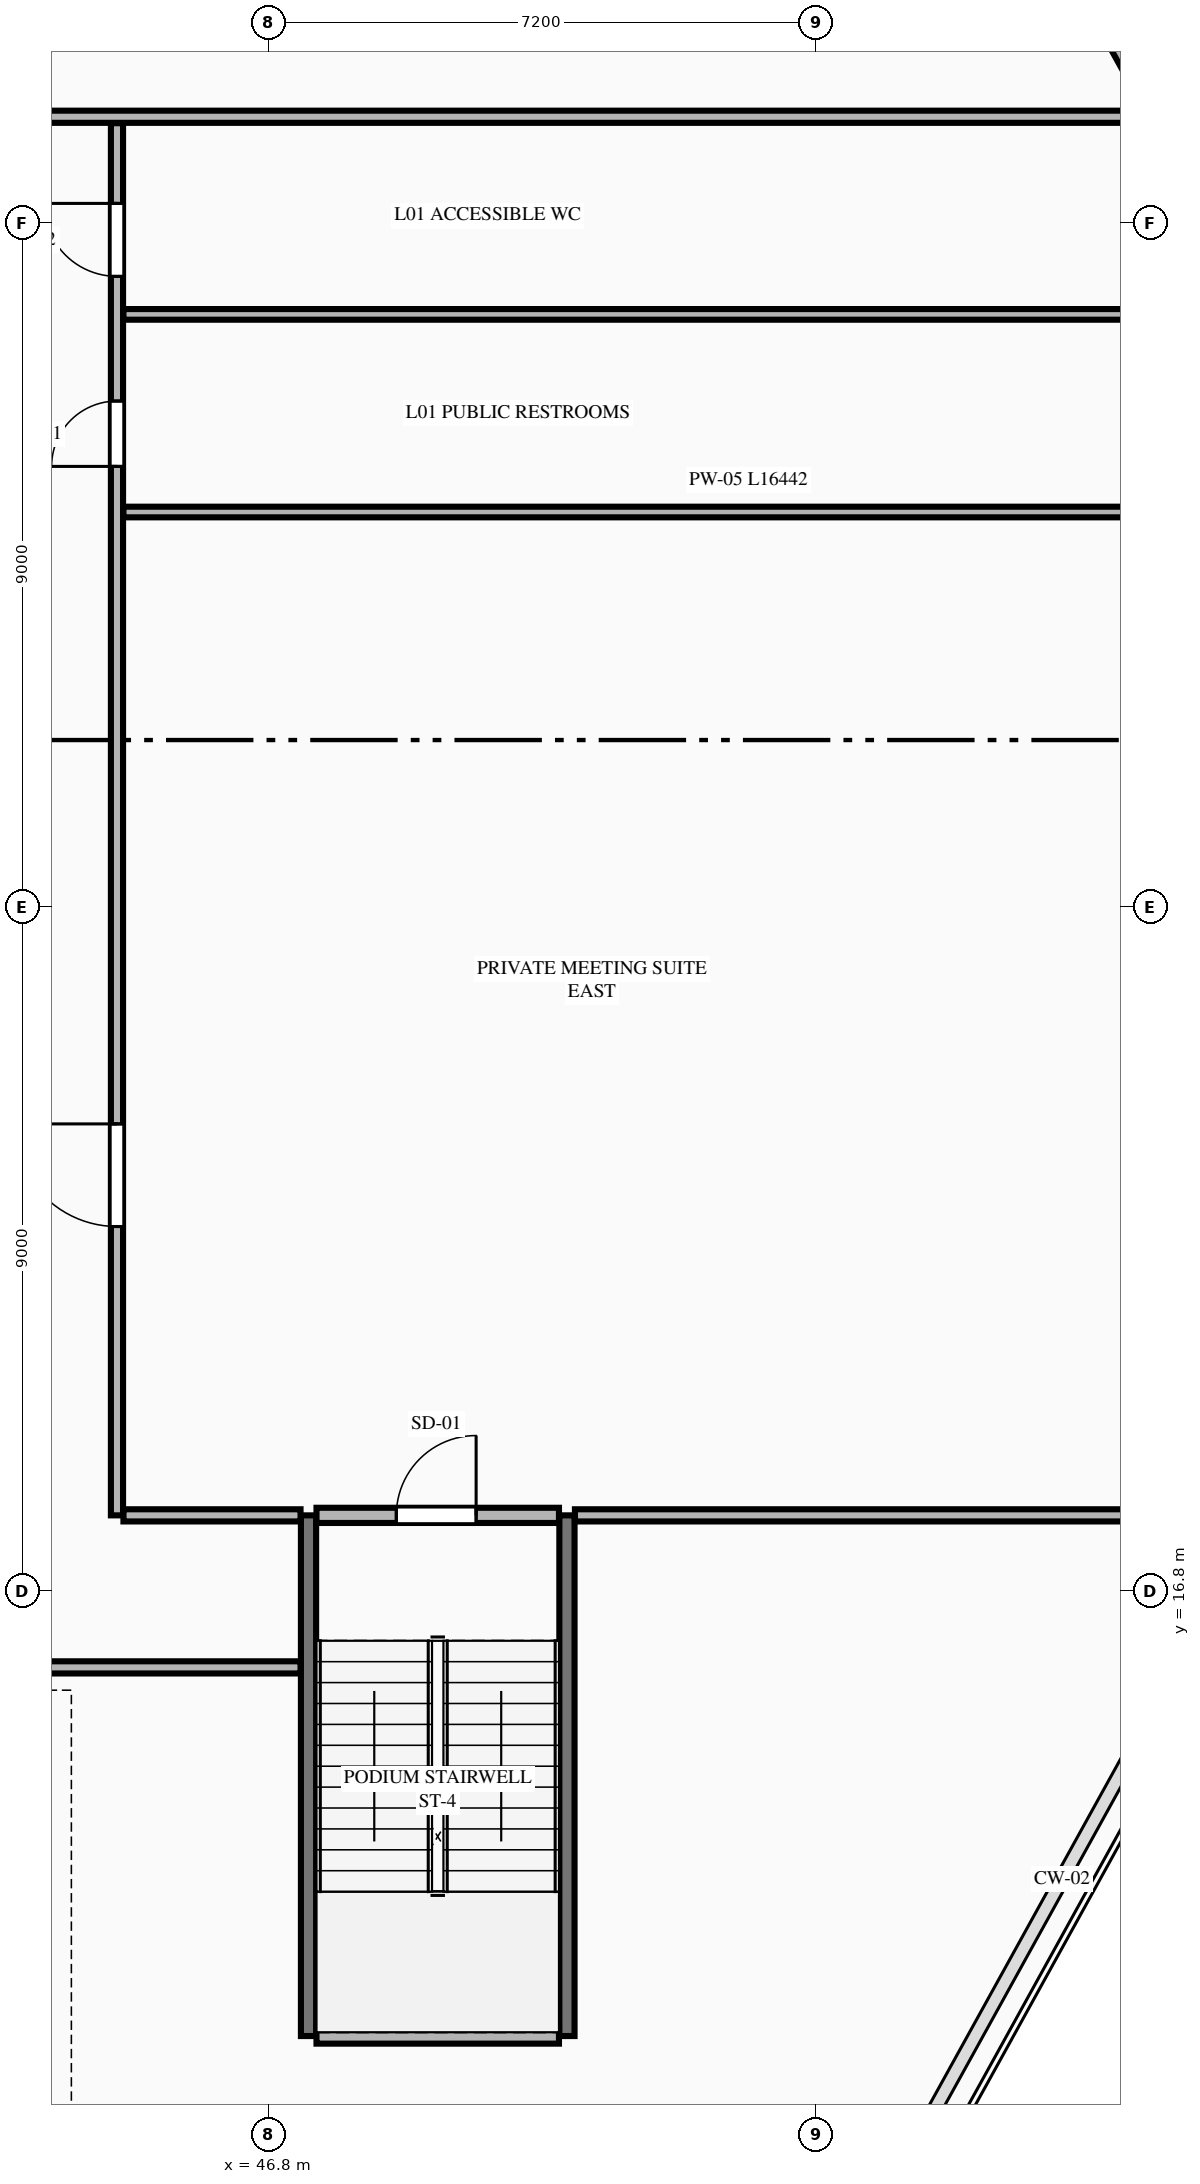
"""IFC4 building model, lengths in metres.
Left out: names, types, materials, properties, quantities, classifications, styles, units other than length and angle.
Written with IfcOpenShell. Run it as: python <this file> out.ifc"""

import sys

from ifc_helpers import new_model, si_unit, direction, frame, frame_2d, origin, place, context, subcontext, project, spatial, rectangle, extrude, element, fill, save


model = new_model("IFC4")
c1 = context("Model", 3, precision=1e-05, world=origin(), true_north=direction((0.0, 1.0)))
c2 = subcontext(c1, "Body", "Model", "MODEL_VIEW")
j1 = project(units=[si_unit("LENGTHUNIT", "METRE"), si_unit("PLANEANGLEUNIT", "RADIAN")], contexts=[c1])
p1 = place(None, origin())
s1 = spatial("IfcSite", under=j1, at=p1, CompositionType="ELEMENT")
p2 = place(p1, origin())
s2 = spatial("IfcBuilding", under=s1, at=p2, CompositionType="ELEMENT")
p3 = place(p2, frame((0.0, 0.0, 6.0)))
s3 = spatial("IfcBuildingStorey", under=s2, at=p3, CompositionType="ELEMENT", Elevation=6.0)
for number, where, z_axis, x_axis in (
    (1, (47.32, 10.95, 0.0), (0.0, 0.0, 1.0), (0.0, 1.0, 0.0)),
    (2, (50.72, 10.95, 0.0), (0.0, 0.0, 1.0), (0.0, 1.0, 0.0)),
):
    element("IfcWall", number, at=place(p3, frame(where, z_axis=z_axis, x_axis=x_axis)), inside=s3, PredefinedType="SHEAR", context=c2, shape_type="SweptSolid", body=[
        extrude(rectangle(XDim=6.85, YDim=0.2, at=frame_2d((3.425, 0.0))), origin(), (0.0, 0.0, 1.0), 4.5),
    ])
p4 = place(p3, frame((47.425, 10.95, 0.0), z_axis=(0.0, 0.0, 1.0), x_axis=(1.0, 0.0, 0.0)))
e3 = element("IfcWall", 3, at=p4, inside=s3, PredefinedType="PLUMBINGWALL", context=c2, shape_type="SweptSolid", body=[
    extrude(rectangle(XDim=3.19, YDim=0.2, at=frame_2d((1.595, 0.0))), origin(), (0.0, 0.0, 1.0), 4.25),
])
p5 = place(p3, frame((47.425, 17.8, 0.0), z_axis=(0.0, 0.0, 1.0), x_axis=(1.0, 0.0, 0.0)))
e4 = element("IfcWall", 4, at=p5, inside=s3, PredefinedType="PLUMBINGWALL", context=c2, shape_type="SweptSolid", body=[
    extrude(rectangle(XDim=3.19, YDim=0.2, at=frame_2d((1.595, 0.0))), origin(), (0.0, 0.0, 1.0), 4.25),
])
p6 = place(p5, frame((1.05, 0.0, 0.0)))
e5 = element("IfcOpeningElement", 5, at=p6, cuts=e4, PredefinedType="OPENING", context=c2, shape_type="SweptSolid", body=[
    extrude(rectangle(XDim=1.05, YDim=2.15, at=frame_2d((0.525, 1.075))), frame((0.0, 0.11, 0.0), z_axis=(0.0, -1.0, 0.0), x_axis=(1.0, 0.0, 0.0)), (0.0, 0.0, 1.0), 0.22),
])
p7 = place(p3, frame((17.625, 15.8, 0.0), z_axis=(0.0, 0.0, 1.0), x_axis=(1.0, 0.0, 0.0)))
e6 = element("IfcWall", 6, at=p7, inside=s3, PredefinedType="PARTITIONING", context=c2, shape_type="SweptSolid", body=[
    extrude(rectangle(XDim=29.59, YDim=0.16, at=frame_2d((14.795, 0.0))), origin(), (0.0, 0.0, 1.0), 4.25),
])
p8 = place(p7, frame((3.5, 0.0, 0.0)))
e7 = element("IfcOpeningElement", 7, at=p8, cuts=e6, PredefinedType="OPENING", context=c2, shape_type="SweptSolid", body=[
    extrude(rectangle(XDim=1.35, YDim=2.35, at=frame_2d((0.675, 1.175))), frame((0.0, 0.09, 0.0), z_axis=(0.0, -1.0, 0.0), x_axis=(1.0, 0.0, 0.0)), (0.0, 0.0, 1.0), 0.18),
])
p9 = place(p7, frame((24.5, 0.0, 0.0)))
e8 = element("IfcOpeningElement", 8, at=p9, cuts=e6, PredefinedType="OPENING", context=c2, shape_type="SweptSolid", body=[
    extrude(rectangle(XDim=1.35, YDim=2.35, at=frame_2d((0.675, 1.175))), frame((0.0, 0.09, 0.0), z_axis=(0.0, -1.0, 0.0), x_axis=(1.0, 0.0, 0.0)), (0.0, 0.0, 1.0), 0.18),
])
p10 = place(p3, frame((44.885, 17.8, 0.0), z_axis=(0.0, 0.0, 1.0), x_axis=(1.0, 0.0, 0.0)))
e9 = element("IfcWall", 9, at=p10, inside=s3, PredefinedType="PARTITIONING", context=c2, shape_type="SweptSolid", body=[
    extrude(rectangle(XDim=2.33, YDim=0.16, at=frame_2d((1.165, 0.0))), origin(), (0.0, 0.0, 1.0), 4.25),
])
p11 = place(p3, frame((50.825, 17.8, 0.0), z_axis=(0.0, 0.0, 1.0), x_axis=(1.0, 0.0, 0.0)))
e10 = element("IfcWall", 10, at=p11, inside=s3, PredefinedType="PARTITIONING", context=c2, shape_type="SweptSolid", body=[
    extrude(rectangle(XDim=8.955, YDim=0.16, at=frame_2d((4.478, 0.0))), origin(), (0.0, 0.0, 1.0), 4.25),
])
p12 = place(p3, frame((44.8, 17.8, 0.0), z_axis=(0.0, 0.0, 1.0), x_axis=(0.0, 1.0, 0.0)))
e11 = element("IfcWall", 11, at=p12, inside=s3, PredefinedType="PARTITIONING", context=c2, shape_type="SweptSolid", body=[
    extrude(rectangle(XDim=18.315, YDim=0.16, at=frame_2d((9.157, 0.0))), origin(), (0.0, 0.0, 1.0), 4.25),
])
p13 = place(p12, frame((3.8, 0.0, 0.0)))
e12 = element("IfcOpeningElement", 12, at=p13, cuts=e11, PredefinedType="OPENING", context=c2, shape_type="SweptSolid", body=[
    extrude(rectangle(XDim=1.35, YDim=2.35, at=frame_2d((0.675, 1.175))), frame((0.0, 0.09, 0.0), z_axis=(0.0, -1.0, 0.0), x_axis=(1.0, 0.0, 0.0)), (0.0, 0.0, 1.0), 0.18),
])
p14 = place(p12, frame((13.8, 0.0, 0.0)))
e13 = element("IfcOpeningElement", 13, at=p14, cuts=e11, PredefinedType="OPENING", context=c2, shape_type="SweptSolid", body=[
    extrude(rectangle(XDim=0.86, YDim=2.1, at=frame_2d((0.43, 1.05))), frame((0.0, 0.09, 0.0), z_axis=(0.0, -1.0, 0.0), x_axis=(1.0, 0.0, 0.0)), (0.0, 0.0, 1.0), 0.18),
])
p15 = place(p12, frame((16.3, 0.0, 0.0)))
e14 = element("IfcOpeningElement", 14, at=p15, cuts=e11, PredefinedType="OPENING", context=c2, shape_type="SweptSolid", body=[
    extrude(rectangle(XDim=0.96, YDim=2.15, at=frame_2d((0.48, 1.075))), frame((0.0, 0.09, 0.0), z_axis=(0.0, -1.0, 0.0), x_axis=(1.0, 0.0, 0.0)), (0.0, 0.0, 1.0), 0.18),
])
p16 = place(p3, frame((6.346, 36.2, 0.0), z_axis=(0.0, 0.0, 1.0), x_axis=(1.0, 0.0, 0.0)))
e15 = element("IfcWall", 15, at=p16, inside=s3, PredefinedType="PARTITIONING", context=c2, shape_type="SweptSolid", body=[
    extrude(rectangle(XDim=52.108, YDim=0.16, at=frame_2d((26.054, 0.0))), origin(), (0.0, 0.0, 1.0), 4.25),
])
p17 = place(p16, frame((6.5, 0.0, 0.0)))
e16 = element("IfcOpeningElement", 16, at=p17, cuts=e15, PredefinedType="OPENING", context=c2, shape_type="SweptSolid", body=[
    extrude(rectangle(XDim=1.35, YDim=2.35, at=frame_2d((0.675, 1.175))), frame((0.0, 0.09, 0.0), z_axis=(0.0, -1.0, 0.0), x_axis=(1.0, 0.0, 0.0)), (0.0, 0.0, 1.0), 0.18),
])
p18 = place(p16, frame((26.5, 0.0, 0.0)))
e17 = element("IfcOpeningElement", 17, at=p18, cuts=e15, PredefinedType="OPENING", context=c2, shape_type="SweptSolid", body=[
    extrude(rectangle(XDim=1.35, YDim=2.35, at=frame_2d((0.675, 1.175))), frame((0.0, 0.09, 0.0), z_axis=(0.0, -1.0, 0.0), x_axis=(1.0, 0.0, 0.0)), (0.0, 0.0, 1.0), 0.18),
])
p19 = place(p3, frame((44.885, 31.0, 0.0), z_axis=(0.0, 0.0, 1.0), x_axis=(1.0, 0.0, 0.0)))
e18 = element("IfcWall", 18, at=p19, inside=s3, PredefinedType="PLUMBINGWALL", context=c2, shape_type="SweptSolid", body=[
    extrude(rectangle(XDim=16.442, YDim=0.14, at=frame_2d((8.221, 0.0))), origin(), (0.0, 0.0, 1.0), 4.25),
])
p20 = place(p3, frame((44.885, 33.6, 0.0), z_axis=(0.0, 0.0, 1.0), x_axis=(1.0, 0.0, 0.0)))
e19 = element("IfcWall", 19, at=p20, inside=s3, PredefinedType="PLUMBINGWALL", context=c2, shape_type="SweptSolid", body=[
    extrude(rectangle(XDim=15.006, YDim=0.14, at=frame_2d((7.503, 0.0))), origin(), (0.0, 0.0, 1.0), 4.25),
])
p21 = place(p3, frame((60.381, 32.889, 0.0), z_axis=(0.0, 0.0, 1.0), x_axis=(-0.483690649574, 0.875239027646, 0.0)))
e20 = element("IfcWall", 20, at=p21, inside=s3, PredefinedType="STANDARD", context=c2, shape_type="SweptSolid", body=[
    extrude(rectangle(XDim=13.015, YDim=0.32, at=frame_2d((6.507, 0.0))), origin(), (0.0, 0.0, 1.0), 4.25),
])
p22 = place(p21, frame((1.439, 0.0, 0.75)))
e21 = element("IfcOpeningElement", 21, at=p22, cuts=e20, PredefinedType="OPENING", context=c2, shape_type="SweptSolid", body=[
    extrude(rectangle(XDim=1.8, YDim=2.4, at=frame_2d((0.9, 1.2))), frame((0.0, 0.17, 0.0), z_axis=(0.0, -1.0, 0.0), x_axis=(1.0, 0.0, 0.0)), (0.0, 0.0, 1.0), 0.34),
])
p23 = place(p21, frame((7.943, 0.0, 0.75)))
e22 = element("IfcOpeningElement", 22, at=p23, cuts=e20, PredefinedType="OPENING", context=c2, shape_type="SweptSolid", body=[
    extrude(rectangle(XDim=1.1, YDim=2.0, at=frame_2d((0.55, 1.0))), frame((0.0, 0.17, 0.0), z_axis=(0.0, -1.0, 0.0), x_axis=(1.0, 0.0, 0.0)), (0.0, 0.0, 1.0), 0.34),
])
p24 = place(p6, origin())
e23 = element("IfcDoor", 23, at=p24, inside=s3, OperationType="SINGLE_SWING_RIGHT", PredefinedType="DOOR", context=c2, shape_type="SweptSolid", body=[
    extrude(rectangle(XDim=1.05, YDim=2.15, at=frame_2d((0.525, 1.075))), frame((0.0, 0.025, 0.0), z_axis=(0.0, -1.0, 0.0), x_axis=(1.0, 0.0, 0.0)), (0.0, 0.0, 1.0), 0.05),
])
fill(e5, e23)
p25 = place(p13, origin())
e24 = element("IfcDoor", 24, at=p25, inside=s3, OperationType="SINGLE_SWING_RIGHT", PredefinedType="DOOR", context=c2, shape_type="SweptSolid", body=[
    extrude(rectangle(XDim=1.35, YDim=2.35, at=frame_2d((0.675, 1.175))), frame((0.0, 0.025, 0.0), z_axis=(0.0, -1.0, 0.0), x_axis=(1.0, 0.0, 0.0)), (0.0, 0.0, 1.0), 0.05),
])
fill(e12, e24)
p26 = place(p14, origin())
e25 = element("IfcDoor", 25, at=p26, inside=s3, OperationType="SINGLE_SWING_LEFT", PredefinedType="DOOR", context=c2, shape_type="SweptSolid", body=[
    extrude(rectangle(XDim=0.86, YDim=2.1, at=frame_2d((0.43, 1.05))), frame((0.0, 0.025, 0.0), z_axis=(0.0, -1.0, 0.0), x_axis=(1.0, 0.0, 0.0)), (0.0, 0.0, 1.0), 0.05),
])
fill(e13, e25)
p27 = place(p15, origin())
e26 = element("IfcDoor", 26, at=p27, inside=s3, OperationType="SINGLE_SWING_RIGHT", PredefinedType="DOOR", context=c2, shape_type="SweptSolid", body=[
    extrude(rectangle(XDim=0.96, YDim=2.15, at=frame_2d((0.48, 1.075))), frame((0.0, 0.025, 0.0), z_axis=(0.0, -1.0, 0.0), x_axis=(1.0, 0.0, 0.0)), (0.0, 0.0, 1.0), 0.05),
])
fill(e14, e26)
save(model, sys.argv[1])
